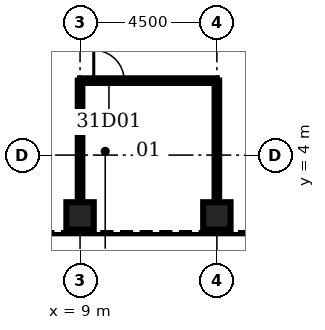
"""IFC4 building model, lengths in metres.
Left out: names, types, materials, properties, quantities, classifications, styles, units other than length and angle.
Written with IfcOpenShell. Run it as: python <this file> out.ifc"""

import sys

from ifc_helpers import new_model, si_unit, direction, frame, frame_2d, origin, origin_2d, place, context, subcontext, project, spatial, rectangle, hollow_rectangle, extrude, element, fill, save


model = new_model("IFC4")
c1 = context("Model", 3, precision=1e-05, world=origin(), true_north=direction((0.0, 1.0)))
c2 = subcontext(c1, "Body", "Model", "MODEL_VIEW")
j1 = project(units=[si_unit("LENGTHUNIT", "METRE"), si_unit("PLANEANGLEUNIT", "RADIAN")], contexts=[c1])
p1 = place(None, origin())
s1 = spatial("IfcSite", under=j1, at=p1, CompositionType="ELEMENT")
p2 = place(p1, origin())
s2 = spatial("IfcBuilding", under=s1, at=p2, CompositionType="ELEMENT")
p3 = place(p2, frame((0.0, 0.0, 142.5)))
s3 = spatial("IfcBuildingStorey", under=s2, at=p3, CompositionType="ELEMENT", Elevation=142.5)
for number, where, z_axis, x_axis in (
    (1, (9.0, 2.0, 0.0), (0.0, 0.0, 1.0), (0.0, 1.0, 0.0)),
    (2, (13.5, 2.0, 0.0), (0.0, 0.0, 1.0), (0.0, 1.0, 0.0)),
):
    element("IfcColumn", number, at=place(p3, frame(where, z_axis=z_axis, x_axis=x_axis)), inside=s3, PredefinedType="COLUMN", context=c2, shape_type="SweptSolid", body=[
        extrude(hollow_rectangle(XDim=0.9, YDim=0.9, WallThickness=0.1, at=origin_2d()), origin(), (0.0, 0.0, 1.0), 4.2),
    ])
p4 = place(p3, frame((9.0, 6.45, 0.0), z_axis=(0.0, 0.0, 1.0), x_axis=(1.0, 0.0, 0.0)))
e3 = element("IfcWall", 3, at=p4, inside=s3, PredefinedType="PARTITIONING", context=c2, shape_type="SweptSolid", body=[
    extrude(rectangle(XDim=4.5, YDim=0.15, at=frame_2d((2.25, 0.0))), origin(), (0.0, 0.0, 1.0), 3.0),
])
p5 = place(p4, frame((0.45, 0.0, 0.0)))
e4 = element("IfcOpeningElement", 4, at=p5, cuts=e3, PredefinedType="OPENING", context=c2, shape_type="SweptSolid", body=[
    extrude(rectangle(XDim=1.0, YDim=2.1, at=frame_2d((0.5, 1.05))), frame((0.0, 0.085, 0.0), z_axis=(0.0, -1.0, 0.0), x_axis=(1.0, 0.0, 0.0)), (0.0, 0.0, 1.0), 0.17),
])
for number, where, z_axis, x_axis in (
    (5, (9.0, 2.45, 0.0), (0.0, 0.0, 1.0), (0.0, 1.0, 0.0)),
    (6, (13.5, 2.45, 0.0), (0.0, 0.0, 1.0), (0.0, 1.0, 0.0)),
):
    element("IfcWall", number, at=place(p3, frame(where, z_axis=z_axis, x_axis=x_axis)), inside=s3, PredefinedType="PARTITIONING", context=c2, shape_type="SweptSolid", body=[
        extrude(rectangle(XDim=4.0, YDim=0.15, at=frame_2d((2.0, 0.0))), origin(), (0.0, 0.0, 1.0), 3.0),
    ])
p6 = place(p5, origin())
e7 = element("IfcDoor", 7, at=p6, inside=s3, OperationType="SINGLE_SWING_LEFT", PredefinedType="DOOR", context=c2, shape_type="SweptSolid", body=[
    extrude(rectangle(XDim=1.0, YDim=2.1, at=frame_2d((0.5, 1.05))), frame((0.0, 0.025, 0.0), z_axis=(0.0, -1.0, 0.0), x_axis=(1.0, 0.0, 0.0)), (0.0, 0.0, 1.0), 0.05),
])
fill(e4, e7)
save(model, sys.argv[1])
